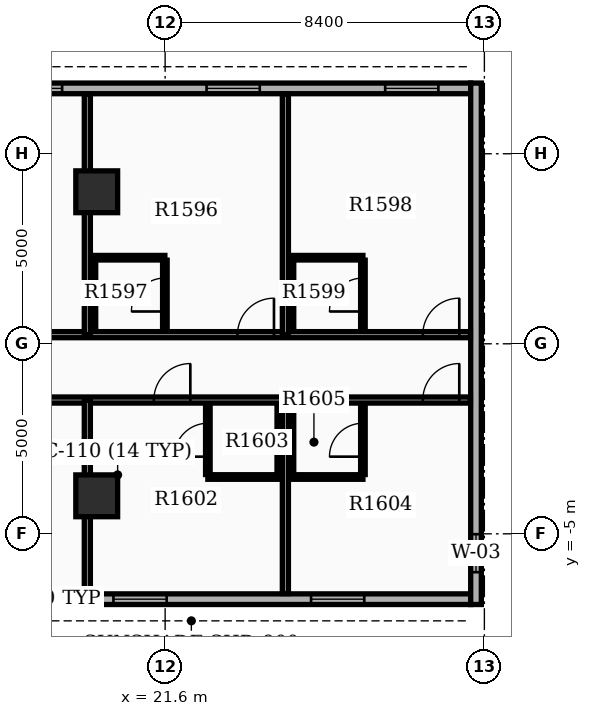
"""IFC4 building model, lengths in metres.
Left out: names, types, materials, properties, quantities, classifications, styles, units other than length and angle.
Written with IfcOpenShell. Run it as: python <this file> out.ifc"""

import sys

from ifc_helpers import new_model, si_unit, direction, frame, frame_2d, origin, origin_2d, place, context, subcontext, project, spatial, rectangle, extrude, element, fill, save


model = new_model("IFC4")
c1 = context("Model", 3, precision=1e-05, world=origin(), true_north=direction((0.0, 1.0)))
c2 = subcontext(c1, "Body", "Model", "MODEL_VIEW")
j1 = project(units=[si_unit("LENGTHUNIT", "METRE"), si_unit("PLANEANGLEUNIT", "RADIAN")], contexts=[c1])
p1 = place(None, origin())
s1 = spatial("IfcSite", under=j1, at=p1, CompositionType="ELEMENT")
p2 = place(p1, origin())
s2 = spatial("IfcBuilding", under=s1, at=p2, CompositionType="ELEMENT")
p3 = place(p2, frame((0.0, 0.0, 104.7)))
s3 = spatial("IfcBuildingStorey", under=s2, at=p3, CompositionType="ELEMENT", Elevation=104.7)
for number, where, z_axis, x_axis in (
    (1, (19.8, -4.0, 0.0), (0.0, 0.0, 1.0), (1.0, 0.0, 0.0)),
    (2, (19.8, 4.0, 0.0), (0.0, 0.0, 1.0), (1.0, 0.0, 0.0)),
):
    element("IfcColumn", number, at=place(p3, frame(where, z_axis=z_axis, x_axis=x_axis)), inside=s3, PredefinedType="COLUMN", context=c2, shape_type="SweptSolid", body=[
        extrude(rectangle(XDim=1.1, YDim=1.1, at=origin_2d()), origin(), (0.0, 0.0, 1.0), 3.9),
    ])
p4 = place(p3, frame((14.94, -6.72, 0.0), z_axis=(0.0, 0.0, 1.0), x_axis=(1.0, 0.0, 0.0)))
e3 = element("IfcWall", 3, at=p4, inside=s3, PredefinedType="STANDARD", context=c2, shape_type="SweptSolid", body=[
    extrude(rectangle(XDim=14.7, YDim=0.28, at=frame_2d((7.35, 0.0))), origin(), (0.0, 0.0, 1.0), 2.97),
])
p5 = place(p4, frame((0.85, 0.0, 0.8)))
e4 = element("IfcOpeningElement", 4, at=p5, cuts=e3, PredefinedType="OPENING", context=c2, shape_type="SweptSolid", body=[
    extrude(rectangle(XDim=1.4, YDim=1.6, at=frame_2d((0.7, 0.8))), frame((0.0, 0.15, 0.0), z_axis=(0.0, -1.0, 0.0), x_axis=(1.0, 0.0, 0.0)), (0.0, 0.0, 1.0), 0.3),
])
p6 = place(p4, frame((5.3, 0.0, 0.8)))
e5 = element("IfcOpeningElement", 5, at=p6, cuts=e3, PredefinedType="OPENING", context=c2, shape_type="SweptSolid", body=[
    extrude(rectangle(XDim=1.4, YDim=1.6, at=frame_2d((0.7, 0.8))), frame((0.0, 0.15, 0.0), z_axis=(0.0, -1.0, 0.0), x_axis=(1.0, 0.0, 0.0)), (0.0, 0.0, 1.0), 0.3),
])
p7 = place(p4, frame((10.5, 0.0, 0.8)))
e6 = element("IfcOpeningElement", 6, at=p7, cuts=e3, PredefinedType="OPENING", context=c2, shape_type="SweptSolid", body=[
    extrude(rectangle(XDim=1.4, YDim=1.6, at=frame_2d((0.7, 0.8))), frame((0.0, 0.15, 0.0), z_axis=(0.0, -1.0, 0.0), x_axis=(1.0, 0.0, 0.0)), (0.0, 0.0, 1.0), 0.3),
])
p8 = place(p3, frame((29.64, 6.72, 0.0), z_axis=(0.0, 0.0, 1.0), x_axis=(-1.0, 0.0, 0.0)))
e7 = element("IfcWall", 7, at=p8, inside=s3, PredefinedType="STANDARD", context=c2, shape_type="SweptSolid", body=[
    extrude(rectangle(XDim=14.7, YDim=0.28, at=frame_2d((7.35, 0.0))), origin(), (0.0, 0.0, 1.0), 2.97),
])
p9 = place(p8, frame((0.85, 0.0, 0.8)))
e8 = element("IfcOpeningElement", 8, at=p9, cuts=e7, PredefinedType="OPENING", context=c2, shape_type="SweptSolid", body=[
    extrude(rectangle(XDim=1.4, YDim=1.6, at=frame_2d((0.7, 0.8))), frame((0.0, 0.15, 0.0), z_axis=(0.0, -1.0, 0.0), x_axis=(1.0, 0.0, 0.0)), (0.0, 0.0, 1.0), 0.3),
])
p10 = place(p8, frame((5.55, 0.0, 0.8)))
e9 = element("IfcOpeningElement", 9, at=p10, cuts=e7, PredefinedType="OPENING", context=c2, shape_type="SweptSolid", body=[
    extrude(rectangle(XDim=1.4, YDim=1.6, at=frame_2d((0.7, 0.8))), frame((0.0, 0.15, 0.0), z_axis=(0.0, -1.0, 0.0), x_axis=(1.0, 0.0, 0.0)), (0.0, 0.0, 1.0), 0.3),
])
p11 = place(p8, frame((10.75, 0.0, 0.8)))
e10 = element("IfcOpeningElement", 10, at=p11, cuts=e7, PredefinedType="OPENING", context=c2, shape_type="SweptSolid", body=[
    extrude(rectangle(XDim=1.4, YDim=1.6, at=frame_2d((0.7, 0.8))), frame((0.0, 0.15, 0.0), z_axis=(0.0, -1.0, 0.0), x_axis=(1.0, 0.0, 0.0)), (0.0, 0.0, 1.0), 0.3),
])
p12 = place(p3, frame((29.78, -6.86, 0.0), z_axis=(0.0, 0.0, 1.0), x_axis=(0.0, 1.0, 0.0)))
e11 = element("IfcWall", 11, at=p12, inside=s3, PredefinedType="STANDARD", context=c2, shape_type="SweptSolid", body=[
    extrude(rectangle(XDim=13.72, YDim=0.28, at=frame_2d((6.86, 0.0))), origin(), (0.0, 0.0, 1.0), 2.97),
])
p13 = place(p12, frame((0.85, 0.0, 0.85)))
e12 = element("IfcOpeningElement", 12, at=p13, cuts=e11, PredefinedType="OPENING", context=c2, shape_type="SweptSolid", body=[
    extrude(rectangle(XDim=1.0, YDim=1.5, at=frame_2d((0.5, 0.75))), frame((0.0, 0.15, 0.0), z_axis=(0.0, -1.0, 0.0), x_axis=(1.0, 0.0, 0.0)), (0.0, 0.0, 1.0), 0.3),
])
p14 = place(p3, frame((14.85, 0.24, 0.0), z_axis=(0.0, 0.0, 1.0), x_axis=(1.0, 0.0, 0.0)))
e13 = element("IfcWall", 13, at=p14, inside=s3, PredefinedType="PARTITIONING", context=c2, shape_type="SweptSolid", body=[
    extrude(rectangle(XDim=14.782, YDim=0.16, at=frame_2d((7.391, 0.0))), origin(), (0.0, 0.0, 1.0), 2.96),
])
p15 = place(p14, frame((2.45, 0.0, 0.0)))
e14 = element("IfcOpeningElement", 14, at=p15, cuts=e13, PredefinedType="OPENING", context=c2, shape_type="SweptSolid", body=[
    extrude(rectangle(XDim=0.96, YDim=2.15, at=frame_2d((0.48, 1.075))), frame((0.0, 0.09, 0.0), z_axis=(0.0, -1.0, 0.0), x_axis=(1.0, 0.0, 0.0)), (0.0, 0.0, 1.0), 0.18),
])
p16 = place(p14, frame((8.654, 0.0, 0.0)))
e15 = element("IfcOpeningElement", 15, at=p16, cuts=e13, PredefinedType="OPENING", context=c2, shape_type="SweptSolid", body=[
    extrude(rectangle(XDim=0.96, YDim=2.15, at=frame_2d((0.48, 1.075))), frame((0.0, 0.09, 0.0), z_axis=(0.0, -1.0, 0.0), x_axis=(1.0, 0.0, 0.0)), (0.0, 0.0, 1.0), 0.18),
])
p17 = place(p14, frame((13.53, 0.0, 0.0)))
e16 = element("IfcOpeningElement", 16, at=p17, cuts=e13, PredefinedType="OPENING", context=c2, shape_type="SweptSolid", body=[
    extrude(rectangle(XDim=0.96, YDim=2.15, at=frame_2d((0.48, 1.075))), frame((0.0, 0.09, 0.0), z_axis=(0.0, -1.0, 0.0), x_axis=(1.0, 0.0, 0.0)), (0.0, 0.0, 1.0), 0.18),
])
for number, where, z_axis, x_axis in (
    (17, (19.553, 0.24, 0.0), (0.0, 0.0, 1.0), (0.0, 1.0, 0.0)),
    (18, (24.764, 0.24, 0.0), (0.0, 0.0, 1.0), (0.0, 1.0, 0.0)),
):
    element("IfcWall", number, at=place(p3, frame(where, z_axis=z_axis, x_axis=x_axis)), inside=s3, PredefinedType="PARTITIONING", context=c2, shape_type="SweptSolid", body=[
        extrude(rectangle(XDim=6.332, YDim=0.16, at=frame_2d((3.166, 0.0))), origin(), (0.0, 0.0, 1.0), 2.96),
    ])
p18 = place(p3, frame((21.593, 0.38, 0.0), z_axis=(0.0, 0.0, 1.0), x_axis=(0.0, 1.0, 0.0)))
e19 = element("IfcWall", 19, at=p18, inside=s3, PredefinedType="PARTITIONING", context=c2, shape_type="SweptSolid", body=[
    extrude(rectangle(XDim=1.82, YDim=0.12, at=frame_2d((0.91, 0.0))), origin(), (0.0, 0.0, 1.0), 2.96),
])
p19 = place(p18, frame((0.47, 0.0, 0.0)))
e20 = element("IfcOpeningElement", 20, at=p19, cuts=e19, PredefinedType="OPENING", context=c2, shape_type="SweptSolid", body=[
    extrude(rectangle(XDim=0.88, YDim=2.1, at=frame_2d((0.44, 1.05))), frame((0.0, 0.07, 0.0), z_axis=(0.0, -1.0, 0.0), x_axis=(1.0, 0.0, 0.0)), (0.0, 0.0, 1.0), 0.14),
])
p20 = place(p3, frame((19.713, 0.38, 0.0), z_axis=(0.0, 0.0, 1.0), x_axis=(0.0, 1.0, 0.0)))
e21 = element("IfcWall", 21, at=p20, inside=s3, PredefinedType="PARTITIONING", context=c2, shape_type="SweptSolid", body=[
    extrude(rectangle(XDim=1.82, YDim=0.12, at=frame_2d((0.91, 0.0))), origin(), (0.0, 0.0, 1.0), 2.96),
])
p21 = place(p3, frame((19.713, 2.265, 0.0), z_axis=(0.0, 0.0, 1.0), x_axis=(1.0, 0.0, 0.0)))
e22 = element("IfcWall", 22, at=p21, inside=s3, PredefinedType="PARTITIONING", context=c2, shape_type="SweptSolid", body=[
    extrude(rectangle(XDim=1.88, YDim=0.12, at=frame_2d((0.94, 0.0))), origin(), (0.0, 0.0, 1.0), 2.96),
])
p22 = place(p3, frame((26.804, 0.38, 0.0), z_axis=(0.0, 0.0, 1.0), x_axis=(0.0, 1.0, 0.0)))
e23 = element("IfcWall", 23, at=p22, inside=s3, PredefinedType="PARTITIONING", context=c2, shape_type="SweptSolid", body=[
    extrude(rectangle(XDim=1.82, YDim=0.12, at=frame_2d((0.91, 0.0))), origin(), (0.0, 0.0, 1.0), 2.96),
])
p23 = place(p22, frame((0.47, 0.0, 0.0)))
e24 = element("IfcOpeningElement", 24, at=p23, cuts=e23, PredefinedType="OPENING", context=c2, shape_type="SweptSolid", body=[
    extrude(rectangle(XDim=0.88, YDim=2.1, at=frame_2d((0.44, 1.05))), frame((0.0, 0.07, 0.0), z_axis=(0.0, -1.0, 0.0), x_axis=(1.0, 0.0, 0.0)), (0.0, 0.0, 1.0), 0.14),
])
p24 = place(p3, frame((24.924, 0.38, 0.0), z_axis=(0.0, 0.0, 1.0), x_axis=(0.0, 1.0, 0.0)))
e25 = element("IfcWall", 25, at=p24, inside=s3, PredefinedType="PARTITIONING", context=c2, shape_type="SweptSolid", body=[
    extrude(rectangle(XDim=1.82, YDim=0.12, at=frame_2d((0.91, 0.0))), origin(), (0.0, 0.0, 1.0), 2.96),
])
p25 = place(p3, frame((24.924, 2.265, 0.0), z_axis=(0.0, 0.0, 1.0), x_axis=(1.0, 0.0, 0.0)))
e26 = element("IfcWall", 26, at=p25, inside=s3, PredefinedType="PARTITIONING", context=c2, shape_type="SweptSolid", body=[
    extrude(rectangle(XDim=1.88, YDim=0.12, at=frame_2d((0.94, 0.0))), origin(), (0.0, 0.0, 1.0), 2.96),
])
p26 = place(p3, frame((14.85, -1.48, 0.0), z_axis=(0.0, 0.0, 1.0), x_axis=(1.0, 0.0, 0.0)))
e27 = element("IfcWall", 27, at=p26, inside=s3, PredefinedType="PARTITIONING", context=c2, shape_type="SweptSolid", body=[
    extrude(rectangle(XDim=14.782, YDim=0.16, at=frame_2d((7.391, 0.0))), origin(), (0.0, 0.0, 1.0), 2.96),
])
p27 = place(p26, frame((2.45, 0.0, 0.0)))
e28 = element("IfcOpeningElement", 28, at=p27, cuts=e27, PredefinedType="OPENING", context=c2, shape_type="SweptSolid", body=[
    extrude(rectangle(XDim=0.96, YDim=2.15, at=frame_2d((0.48, 1.075))), frame((0.0, 0.09, 0.0), z_axis=(0.0, -1.0, 0.0), x_axis=(1.0, 0.0, 0.0)), (0.0, 0.0, 1.0), 0.18),
])
p28 = place(p26, frame((6.453, 0.0, 0.0)))
e29 = element("IfcOpeningElement", 29, at=p28, cuts=e27, PredefinedType="OPENING", context=c2, shape_type="SweptSolid", body=[
    extrude(rectangle(XDim=0.96, YDim=2.15, at=frame_2d((0.48, 1.075))), frame((0.0, 0.09, 0.0), z_axis=(0.0, -1.0, 0.0), x_axis=(1.0, 0.0, 0.0)), (0.0, 0.0, 1.0), 0.18),
])
p29 = place(p26, frame((13.53, 0.0, 0.0)))
e30 = element("IfcOpeningElement", 30, at=p29, cuts=e27, PredefinedType="OPENING", context=c2, shape_type="SweptSolid", body=[
    extrude(rectangle(XDim=0.96, YDim=2.15, at=frame_2d((0.48, 1.075))), frame((0.0, 0.09, 0.0), z_axis=(0.0, -1.0, 0.0), x_axis=(1.0, 0.0, 0.0)), (0.0, 0.0, 1.0), 0.18),
])
for number, where, z_axis, x_axis in (
    (31, (19.553, -1.48, 0.0), (0.0, 0.0, 1.0), (0.0, -1.0, 0.0)),
    (32, (24.764, -1.48, 0.0), (0.0, 0.0, 1.0), (0.0, -1.0, 0.0)),
):
    element("IfcWall", number, at=place(p3, frame(where, z_axis=z_axis, x_axis=x_axis)), inside=s3, PredefinedType="PARTITIONING", context=c2, shape_type="SweptSolid", body=[
        extrude(rectangle(XDim=5.092, YDim=0.16, at=frame_2d((2.546, 0.0))), origin(), (0.0, 0.0, 1.0), 2.96),
    ])
p30 = place(p3, frame((22.724, -3.44, 0.0), z_axis=(0.0, 0.0, 1.0), x_axis=(0.0, 1.0, 0.0)))
e33 = element("IfcWall", 33, at=p30, inside=s3, PredefinedType="PARTITIONING", context=c2, shape_type="SweptSolid", body=[
    extrude(rectangle(XDim=1.82, YDim=0.12, at=frame_2d((0.91, 0.0))), origin(), (0.0, 0.0, 1.0), 2.96),
])
p31 = place(p30, frame((0.47, 0.0, 0.0)))
e34 = element("IfcOpeningElement", 34, at=p31, cuts=e33, PredefinedType="OPENING", context=c2, shape_type="SweptSolid", body=[
    extrude(rectangle(XDim=0.88, YDim=2.1, at=frame_2d((0.44, 1.05))), frame((0.0, 0.07, 0.0), z_axis=(0.0, -1.0, 0.0), x_axis=(1.0, 0.0, 0.0)), (0.0, 0.0, 1.0), 0.14),
])
p32 = place(p3, frame((24.604, -3.44, 0.0), z_axis=(0.0, 0.0, 1.0), x_axis=(0.0, 1.0, 0.0)))
e35 = element("IfcWall", 35, at=p32, inside=s3, PredefinedType="PARTITIONING", context=c2, shape_type="SweptSolid", body=[
    extrude(rectangle(XDim=1.82, YDim=0.12, at=frame_2d((0.91, 0.0))), origin(), (0.0, 0.0, 1.0), 2.96),
])
p33 = place(p3, frame((22.724, -3.505, 0.0), z_axis=(0.0, 0.0, 1.0), x_axis=(1.0, 0.0, 0.0)))
e36 = element("IfcWall", 36, at=p33, inside=s3, PredefinedType="PARTITIONING", context=c2, shape_type="SweptSolid", body=[
    extrude(rectangle(XDim=1.88, YDim=0.12, at=frame_2d((0.94, 0.0))), origin(), (0.0, 0.0, 1.0), 2.96),
])
p34 = place(p3, frame((26.804, -3.44, 0.0), z_axis=(0.0, 0.0, 1.0), x_axis=(0.0, 1.0, 0.0)))
e37 = element("IfcWall", 37, at=p34, inside=s3, PredefinedType="PARTITIONING", context=c2, shape_type="SweptSolid", body=[
    extrude(rectangle(XDim=1.82, YDim=0.12, at=frame_2d((0.91, 0.0))), origin(), (0.0, 0.0, 1.0), 2.96),
])
p35 = place(p34, frame((0.47, 0.0, 0.0)))
e38 = element("IfcOpeningElement", 38, at=p35, cuts=e37, PredefinedType="OPENING", context=c2, shape_type="SweptSolid", body=[
    extrude(rectangle(XDim=0.88, YDim=2.1, at=frame_2d((0.44, 1.05))), frame((0.0, 0.07, 0.0), z_axis=(0.0, -1.0, 0.0), x_axis=(1.0, 0.0, 0.0)), (0.0, 0.0, 1.0), 0.14),
])
p36 = place(p3, frame((24.924, -3.44, 0.0), z_axis=(0.0, 0.0, 1.0), x_axis=(0.0, 1.0, 0.0)))
e39 = element("IfcWall", 39, at=p36, inside=s3, PredefinedType="PARTITIONING", context=c2, shape_type="SweptSolid", body=[
    extrude(rectangle(XDim=1.82, YDim=0.12, at=frame_2d((0.91, 0.0))), origin(), (0.0, 0.0, 1.0), 2.96),
])
p37 = place(p3, frame((24.924, -3.505, 0.0), z_axis=(0.0, 0.0, 1.0), x_axis=(1.0, 0.0, 0.0)))
e40 = element("IfcWall", 40, at=p37, inside=s3, PredefinedType="PARTITIONING", context=c2, shape_type="SweptSolid", body=[
    extrude(rectangle(XDim=1.88, YDim=0.12, at=frame_2d((0.94, 0.0))), origin(), (0.0, 0.0, 1.0), 2.96),
])
p38 = place(p6, origin())
e41 = element("IfcWindow", 41, at=p38, inside=s3, PartitioningType="SINGLE_PANEL", PredefinedType="WINDOW", context=c2, shape_type="SweptSolid", body=[
    extrude(rectangle(XDim=1.4, YDim=1.6, at=frame_2d((0.7, 0.8))), frame((0.0, 0.03, 0.0), z_axis=(0.0, -1.0, 0.0), x_axis=(1.0, 0.0, 0.0)), (0.0, 0.0, 1.0), 0.06),
])
fill(e5, e41)
p39 = place(p7, origin())
e42 = element("IfcWindow", 42, at=p39, inside=s3, PartitioningType="SINGLE_PANEL", PredefinedType="WINDOW", context=c2, shape_type="SweptSolid", body=[
    extrude(rectangle(XDim=1.4, YDim=1.6, at=frame_2d((0.7, 0.8))), frame((0.0, 0.03, 0.0), z_axis=(0.0, -1.0, 0.0), x_axis=(1.0, 0.0, 0.0)), (0.0, 0.0, 1.0), 0.06),
])
fill(e6, e42)
p40 = place(p9, origin())
e43 = element("IfcWindow", 43, at=p40, inside=s3, PartitioningType="SINGLE_PANEL", PredefinedType="WINDOW", context=c2, shape_type="SweptSolid", body=[
    extrude(rectangle(XDim=1.4, YDim=1.6, at=frame_2d((0.7, 0.8))), frame((0.0, 0.03, 0.0), z_axis=(0.0, -1.0, 0.0), x_axis=(1.0, 0.0, 0.0)), (0.0, 0.0, 1.0), 0.06),
])
fill(e8, e43)
p41 = place(p10, origin())
e44 = element("IfcWindow", 44, at=p41, inside=s3, PartitioningType="SINGLE_PANEL", PredefinedType="WINDOW", context=c2, shape_type="SweptSolid", body=[
    extrude(rectangle(XDim=1.4, YDim=1.6, at=frame_2d((0.7, 0.8))), frame((0.0, 0.03, 0.0), z_axis=(0.0, -1.0, 0.0), x_axis=(1.0, 0.0, 0.0)), (0.0, 0.0, 1.0), 0.06),
])
fill(e9, e44)
p42 = place(p11, origin())
e45 = element("IfcWindow", 45, at=p42, inside=s3, PartitioningType="SINGLE_PANEL", PredefinedType="WINDOW", context=c2, shape_type="SweptSolid", body=[
    extrude(rectangle(XDim=1.4, YDim=1.6, at=frame_2d((0.7, 0.8))), frame((0.0, 0.03, 0.0), z_axis=(0.0, -1.0, 0.0), x_axis=(1.0, 0.0, 0.0)), (0.0, 0.0, 1.0), 0.06),
])
fill(e10, e45)
p43 = place(p13, origin())
e46 = element("IfcWindow", 46, at=p43, inside=s3, PartitioningType="SINGLE_PANEL", PredefinedType="WINDOW", context=c2, shape_type="SweptSolid", body=[
    extrude(rectangle(XDim=1.0, YDim=1.5, at=frame_2d((0.5, 0.75))), frame((0.0, 0.03, 0.0), z_axis=(0.0, -1.0, 0.0), x_axis=(1.0, 0.0, 0.0)), (0.0, 0.0, 1.0), 0.06),
])
fill(e12, e46)
p44 = place(p16, origin())
e47 = element("IfcDoor", 47, at=p44, inside=s3, OperationType="SINGLE_SWING_RIGHT", PredefinedType="DOOR", context=c2, shape_type="SweptSolid", body=[
    extrude(rectangle(XDim=0.96, YDim=2.15, at=frame_2d((0.48, 1.075))), frame((0.0, 0.025, 0.0), z_axis=(0.0, -1.0, 0.0), x_axis=(1.0, 0.0, 0.0)), (0.0, 0.0, 1.0), 0.05),
])
fill(e15, e47)
p45 = place(p19, origin())
e48 = element("IfcDoor", 48, at=p45, inside=s3, OperationType="SINGLE_SWING_LEFT", PredefinedType="DOOR", context=c2, shape_type="SweptSolid", body=[
    extrude(rectangle(XDim=0.88, YDim=2.1, at=frame_2d((0.44, 1.05))), frame((0.0, 0.025, 0.0), z_axis=(0.0, -1.0, 0.0), x_axis=(1.0, 0.0, 0.0)), (0.0, 0.0, 1.0), 0.05),
])
fill(e20, e48)
p46 = place(p17, origin())
e49 = element("IfcDoor", 49, at=p46, inside=s3, OperationType="SINGLE_SWING_RIGHT", PredefinedType="DOOR", context=c2, shape_type="SweptSolid", body=[
    extrude(rectangle(XDim=0.96, YDim=2.15, at=frame_2d((0.48, 1.075))), frame((0.0, 0.025, 0.0), z_axis=(0.0, -1.0, 0.0), x_axis=(1.0, 0.0, 0.0)), (0.0, 0.0, 1.0), 0.05),
])
fill(e16, e49)
p47 = place(p23, origin())
e50 = element("IfcDoor", 50, at=p47, inside=s3, OperationType="SINGLE_SWING_LEFT", PredefinedType="DOOR", context=c2, shape_type="SweptSolid", body=[
    extrude(rectangle(XDim=0.88, YDim=2.1, at=frame_2d((0.44, 1.05))), frame((0.0, 0.025, 0.0), z_axis=(0.0, -1.0, 0.0), x_axis=(1.0, 0.0, 0.0)), (0.0, 0.0, 1.0), 0.05),
])
fill(e24, e50)
p48 = place(p28, origin())
e51 = element("IfcDoor", 51, at=p48, inside=s3, OperationType="SINGLE_SWING_RIGHT", PredefinedType="DOOR", context=c2, shape_type="SweptSolid", body=[
    extrude(rectangle(XDim=0.96, YDim=2.15, at=frame_2d((0.48, 1.075))), frame((0.0, 0.025, 0.0), z_axis=(0.0, -1.0, 0.0), x_axis=(1.0, 0.0, 0.0)), (0.0, 0.0, 1.0), 0.05),
])
fill(e29, e51)
p49 = place(p31, origin())
e52 = element("IfcDoor", 52, at=p49, inside=s3, OperationType="SINGLE_SWING_LEFT", PredefinedType="DOOR", context=c2, shape_type="SweptSolid", body=[
    extrude(rectangle(XDim=0.88, YDim=2.1, at=frame_2d((0.44, 1.05))), frame((0.0, 0.025, 0.0), z_axis=(0.0, -1.0, 0.0), x_axis=(1.0, 0.0, 0.0)), (0.0, 0.0, 1.0), 0.05),
])
fill(e34, e52)
p50 = place(p29, origin())
e53 = element("IfcDoor", 53, at=p50, inside=s3, OperationType="SINGLE_SWING_RIGHT", PredefinedType="DOOR", context=c2, shape_type="SweptSolid", body=[
    extrude(rectangle(XDim=0.96, YDim=2.15, at=frame_2d((0.48, 1.075))), frame((0.0, 0.025, 0.0), z_axis=(0.0, -1.0, 0.0), x_axis=(1.0, 0.0, 0.0)), (0.0, 0.0, 1.0), 0.05),
])
fill(e30, e53)
p51 = place(p35, origin())
e54 = element("IfcDoor", 54, at=p51, inside=s3, OperationType="SINGLE_SWING_LEFT", PredefinedType="DOOR", context=c2, shape_type="SweptSolid", body=[
    extrude(rectangle(XDim=0.88, YDim=2.1, at=frame_2d((0.44, 1.05))), frame((0.0, 0.025, 0.0), z_axis=(0.0, -1.0, 0.0), x_axis=(1.0, 0.0, 0.0)), (0.0, 0.0, 1.0), 0.05),
])
fill(e38, e54)
save(model, sys.argv[1])
